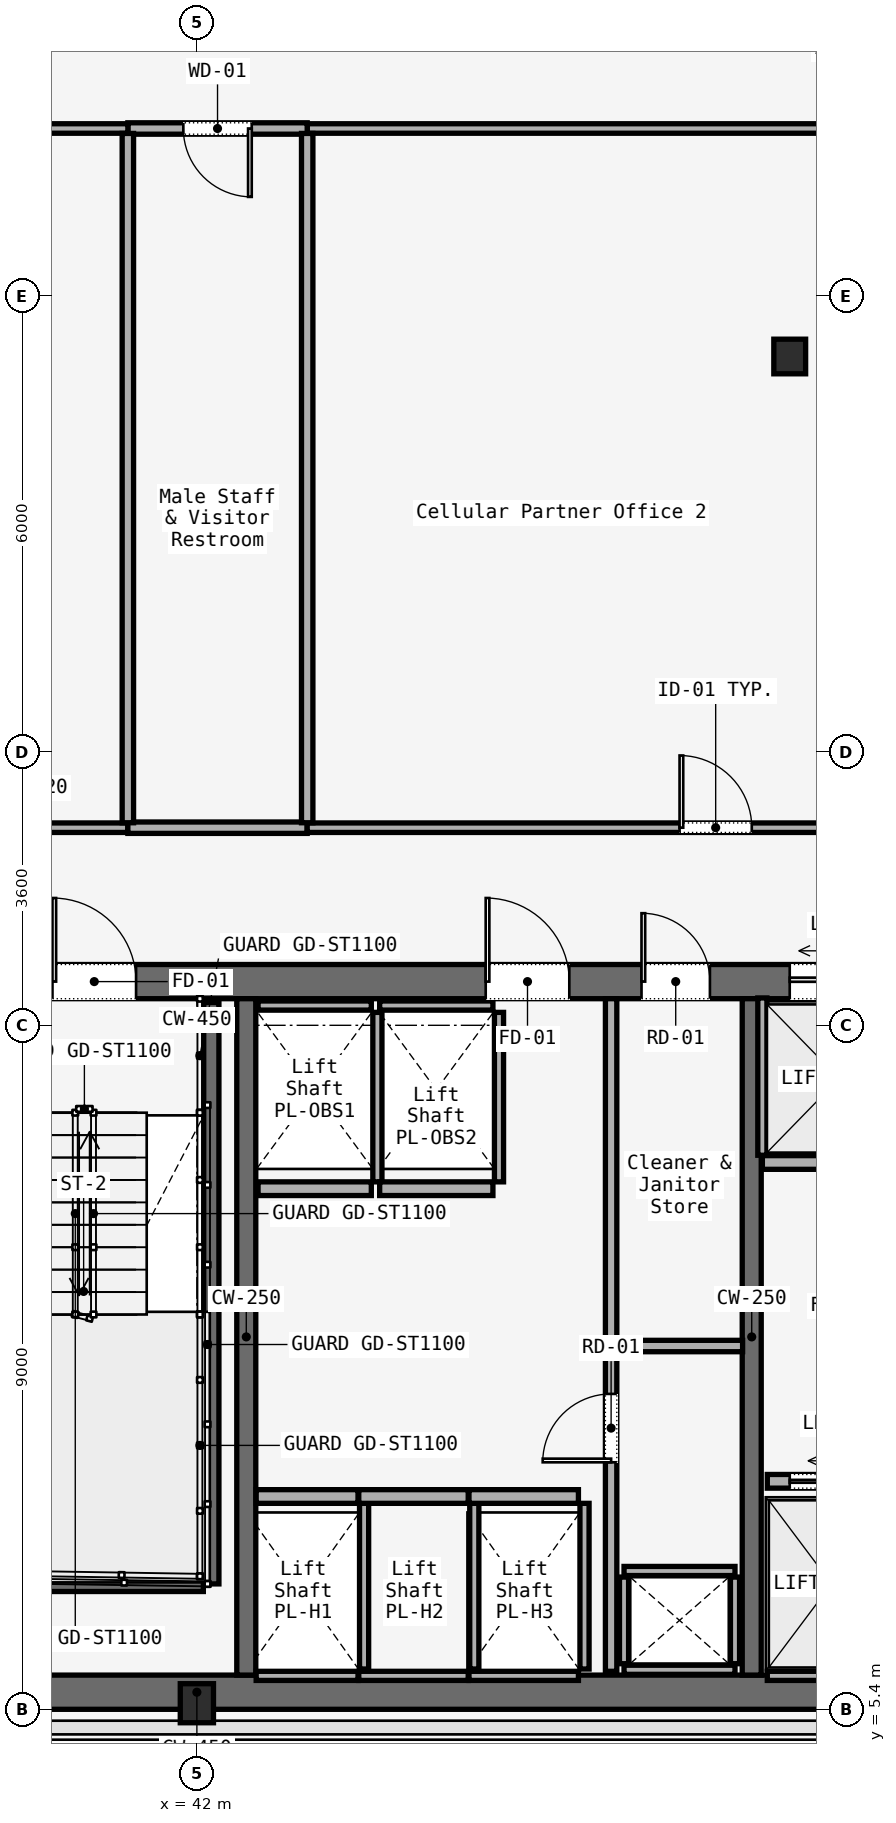
"""IFC4 building model, lengths in metres.
Left out: names, types, materials, properties, quantities, classifications, styles, units other than length and angle.
Written with IfcOpenShell. Run it as: python <this file> out.ifc"""

import sys

from ifc_helpers import new_model, si_unit, direction, frame, frame_2d, origin, origin_2d, place, context, subcontext, project, spatial, rectangle, i_section, extrude, element, fill, save


model = new_model("IFC4")
c1 = context("Model", 3, precision=1e-05, world=origin(), true_north=direction((0.0, 1.0)))
c2 = subcontext(c1, "Body", "Model", "MODEL_VIEW")
j1 = project(units=[si_unit("LENGTHUNIT", "METRE"), si_unit("PLANEANGLEUNIT", "RADIAN")], contexts=[c1])
p1 = place(None, origin())
s1 = spatial("IfcSite", under=j1, at=p1, CompositionType="ELEMENT")
p2 = place(p1, origin())
s2 = spatial("IfcBuilding", under=s1, at=p2, CompositionType="ELEMENT")
p3 = place(p2, frame((0.0, 0.0, 81.6)))
s3 = spatial("IfcBuildingStorey", under=s2, at=p3, CompositionType="ELEMENT", Elevation=81.6)
p4 = place(p3, frame((26.45, 14.975, 0.0), z_axis=(0.0, 0.0, 1.0), x_axis=(1.0, 0.0, 0.0)))
e1 = element("IfcWall", 1, at=p4, inside=s3, PredefinedType="SOLIDWALL", context=c2, shape_type="SweptSolid", body=[
    extrude(rectangle(XDim=31.1, YDim=0.45, at=frame_2d((15.55, 0.0))), origin(), (0.0, 0.0, 1.0), 3.58),
])
p5 = place(p4, frame((1.65, 0.0, 0.0)))
e2 = element("IfcOpeningElement", 2, at=p5, cuts=e1, PredefinedType="OPENING", context=c2, shape_type="SweptSolid", body=[
    extrude(rectangle(XDim=1.1, YDim=2.2, at=frame_2d((0.55, 1.1))), frame((0.0, 0.225, 0.0), z_axis=(0.0, -1.0, 0.0), x_axis=(1.0, 0.0, 0.0)), (0.0, 0.0, 1.0), 0.45),
])
p6 = place(p4, frame((13.65, 0.0, 0.0)))
e3 = element("IfcOpeningElement", 3, at=p6, cuts=e1, PredefinedType="OPENING", context=c2, shape_type="SweptSolid", body=[
    extrude(rectangle(XDim=1.1, YDim=2.2, at=frame_2d((0.55, 1.1))), frame((0.0, 0.225, 0.0), z_axis=(0.0, -1.0, 0.0), x_axis=(1.0, 0.0, 0.0)), (0.0, 0.0, 1.0), 0.45),
])
p7 = place(p4, frame((25.55, 0.0, 0.0)))
e4 = element("IfcOpeningElement", 4, at=p7, cuts=e1, PredefinedType="OPENING", context=c2, shape_type="SweptSolid", body=[
    extrude(rectangle(XDim=1.1, YDim=2.2, at=frame_2d((0.55, 1.1))), frame((0.0, 0.225, 0.0), z_axis=(0.0, -1.0, 0.0), x_axis=(1.0, 0.0, 0.0)), (0.0, 0.0, 1.0), 0.45),
])
p8 = place(p4, frame((10.7, 0.0, 0.0)))
e5 = element("IfcOpeningElement", 5, at=p8, cuts=e1, PredefinedType="OPENING", context=c2, shape_type="SweptSolid", body=[
    extrude(rectangle(XDim=1.4, YDim=2.2, at=frame_2d((0.7, 1.1))), frame((0.0, 0.225, 0.0), z_axis=(0.0, -1.0, 0.0), x_axis=(1.0, 0.0, 0.0)), (0.0, 0.0, 1.0), 0.45),
])
p9 = place(p4, frame((19.35, 0.0, 0.0)))
e6 = element("IfcOpeningElement", 6, at=p9, cuts=e1, PredefinedType="OPENING", context=c2, shape_type="SweptSolid", body=[
    extrude(rectangle(XDim=1.1, YDim=2.2, at=frame_2d((0.55, 1.1))), frame((0.0, 0.225, 0.0), z_axis=(0.0, -1.0, 0.0), x_axis=(1.0, 0.0, 0.0)), (0.0, 0.0, 1.0), 0.45),
])
p10 = place(p4, frame((21.4, 0.0, 0.0)))
e7 = element("IfcOpeningElement", 7, at=p10, cuts=e1, PredefinedType="OPENING", context=c2, shape_type="SweptSolid", body=[
    extrude(rectangle(XDim=0.9, YDim=2.1, at=frame_2d((0.45, 1.05))), frame((0.0, 0.225, 0.0), z_axis=(0.0, -1.0, 0.0), x_axis=(1.0, 0.0, 0.0)), (0.0, 0.0, 1.0), 0.45),
])
p11 = place(p4, frame((23.35, 0.0, 0.0)))
e8 = element("IfcOpeningElement", 8, at=p11, cuts=e1, PredefinedType="OPENING", context=c2, shape_type="SweptSolid", body=[
    extrude(rectangle(XDim=1.3, YDim=2.3, at=frame_2d((0.65, 1.15))), frame((0.0, 0.225, 0.0), z_axis=(0.0, -1.0, 0.0), x_axis=(1.0, 0.0, 0.0)), (0.0, 0.0, 1.0), 0.45),
])
p12 = place(p3, frame((26.45, 5.625, 0.0), z_axis=(0.0, 0.0, 1.0), x_axis=(1.0, 0.0, 0.0)))
e9 = element("IfcWall", 9, at=p12, inside=s3, PredefinedType="SOLIDWALL", context=c2, shape_type="SweptSolid", body=[
    extrude(rectangle(XDim=31.1, YDim=0.45, at=frame_2d((15.55, 0.0))), origin(), (0.0, 0.0, 1.0), 3.58),
])
for number, where, z_axis, x_axis in (
    (10, (42.65, 5.85, 0.0), (0.0, 0.0, 1.0), (0.0, 1.0, 0.0)),
    (11, (49.3, 5.85, 0.0), (0.0, 0.0, 1.0), (0.0, 1.0, 0.0)),
):
    element("IfcWall", number, at=place(p3, frame(where, z_axis=z_axis, x_axis=x_axis)), inside=s3, PredefinedType="SOLIDWALL", context=c2, shape_type="SweptSolid", body=[
        extrude(rectangle(XDim=8.9, YDim=0.25, at=frame_2d((4.45, 0.0))), origin(), (0.0, 0.0, 1.0), 3.58),
    ])
p13 = place(p3, frame((49.8, 23.2, 0.0), z_axis=(0.0, 0.0, 1.0), x_axis=(1.0, 0.0, 0.0)))
e12 = element("IfcColumn", 12, at=p13, inside=s3, PredefinedType="COLUMN", context=c2, shape_type="SweptSolid", body=[
    extrude(i_section(OverallWidth=0.418, OverallDepth=0.456, WebThickness=0.042, FlangeThickness=0.067, FilletRadius=0.015, at=origin_2d()), origin(), (0.0, 0.0, 1.0), 3.58),
])
p14 = place(p3, frame((42.0, 5.48, 0.0), z_axis=(0.0, 0.0, 1.0), x_axis=(1.0, 0.0, 0.0)))
e13 = element("IfcColumn", 13, at=p14, inside=s3, PredefinedType="COLUMN", context=c2, shape_type="SweptSolid", body=[
    extrude(i_section(OverallWidth=0.437, OverallDepth=0.514, WebThickness=0.061, FlangeThickness=0.077, FilletRadius=0.015, at=origin_2d()), origin(), (0.0, 0.0, 1.0), 3.58),
])
p15 = place(p3, frame((42.19, 14.7, 0.0), z_axis=(0.0, 0.0, 1.0), x_axis=(0.0, -1.0, 0.0)))
e14 = element("IfcWall", 14, at=p15, inside=s3, PredefinedType="SOLIDWALL", context=c2, shape_type="SweptSolid", body=[
    extrude(rectangle(XDim=7.65, YDim=0.2, at=frame_2d((3.825, 0.0))), origin(), (0.0, 0.0, 1.0), 3.8),
])
p16 = place(p3, frame((38.97, 7.05, 0.0), z_axis=(0.0, 0.0, 1.0), x_axis=(1.0, 0.0, 0.0)))
e15 = element("IfcWall", 15, at=p16, inside=s3, PredefinedType="SOLIDWALL", context=c2, shape_type="SweptSolid", body=[
    extrude(rectangle(XDim=3.115, YDim=0.2, at=frame_2d((1.558, 0.0))), origin(), (0.0, 0.0, 1.0), 3.8),
])
for number, where, z_axis, x_axis in (
    (16, (47.62, 5.92, 0.0), (0.0, 0.0, 1.0), (1.0, 0.0, 0.0)),
    (17, (47.62, 7.22, 0.0), (0.0, 0.0, 1.0), (1.0, 0.0, 0.0)),
):
    element("IfcWall", number, at=place(p3, frame(where, z_axis=z_axis, x_axis=x_axis)), inside=s3, PredefinedType="SOLIDWALL", context=c2, shape_type="SweptSolid", body=[
        extrude(rectangle(XDim=1.46, YDim=0.12, at=frame_2d((0.73, 0.0))), origin(), (0.0, 0.0, 1.0), 2.95),
    ])
for number, where, z_axis, x_axis in (
    (18, (47.62, 6.0, 0.0), (0.0, 0.0, 1.0), (0.0, 1.0, 0.0)),
    (19, (49.08, 6.0, 0.0), (0.0, 0.0, 1.0), (0.0, 1.0, 0.0)),
):
    element("IfcWall", number, at=place(p3, frame(where, z_axis=z_axis, x_axis=x_axis)), inside=s3, PredefinedType="SOLIDWALL", context=c2, shape_type="SweptSolid", body=[
        extrude(rectangle(XDim=1.14, YDim=0.12, at=frame_2d((0.57, 0.0))), origin(), (0.0, 0.0, 1.0), 2.95),
    ])
p17 = place(p3, frame((47.45, 5.9, 0.0), z_axis=(0.0, 0.0, 1.0), x_axis=(0.0, 1.0, 0.0)))
e20 = element("IfcWall", 20, at=p17, inside=s3, PredefinedType="PARTITIONING", context=c2, shape_type="SweptSolid", body=[
    extrude(rectangle(XDim=8.85, YDim=0.15, at=frame_2d((4.425, 0.0))), origin(), (0.0, 0.0, 1.0), 2.95),
])
p18 = place(p17, frame((2.75, 0.0, 0.0)))
e21 = element("IfcOpeningElement", 21, at=p18, cuts=e20, PredefinedType="OPENING", context=c2, shape_type="SweptSolid", body=[
    extrude(rectangle(XDim=0.9, YDim=2.1, at=frame_2d((0.45, 1.05))), frame((0.0, 0.075, 0.0), z_axis=(0.0, -1.0, 0.0), x_axis=(1.0, 0.0, 0.0)), (0.0, 0.0, 1.0), 0.15),
])
p19 = place(p3, frame((47.45, 10.18, 0.0), z_axis=(0.0, 0.0, 1.0), x_axis=(1.0, 0.0, 0.0)))
e22 = element("IfcWall", 22, at=p19, inside=s3, PredefinedType="PARTITIONING", context=c2, shape_type="SweptSolid", body=[
    extrude(rectangle(XDim=1.73, YDim=0.15, at=frame_2d((0.865, 0.0))), origin(), (0.0, 0.0, 1.0), 2.95),
])
p20 = place(p3, frame((42.78, 8.2, 0.0), z_axis=(0.0, 0.0, 1.0), x_axis=(1.0, 0.0, 0.0)))
e23 = element("IfcWall", 23, at=p20, inside=s3, PredefinedType="SOLIDWALL", context=c2, shape_type="SweptSolid", body=[
    extrude(rectangle(XDim=1.34, YDim=0.18, at=frame_2d((0.67, 0.0))), origin(), (0.0, 0.0, 1.0), 2.95),
])
p21 = place(p3, frame((42.78, 5.84, 0.0), z_axis=(0.0, 0.0, 1.0), x_axis=(1.0, 0.0, 0.0)))
e24 = element("IfcWall", 24, at=p21, inside=s3, PredefinedType="SOLIDWALL", context=c2, shape_type="SweptSolid", body=[
    extrude(rectangle(XDim=1.34, YDim=0.12, at=frame_2d((0.67, 0.0))), origin(), (0.0, 0.0, 1.0), 2.95),
])
p22 = place(p3, frame((44.2, 5.93, 0.0), z_axis=(0.0, 0.0, 1.0), x_axis=(0.0, 1.0, 0.0)))
e25 = element("IfcWall", 25, at=p22, inside=s3, PredefinedType="SOLIDWALL", context=c2, shape_type="SweptSolid", body=[
    extrude(rectangle(XDim=2.18, YDim=0.12, at=frame_2d((1.09, 0.0))), origin(), (0.0, 0.0, 1.0), 2.95),
])
p23 = place(p3, frame((44.13, 8.2, 0.0), z_axis=(0.0, 0.0, 1.0), x_axis=(1.0, 0.0, 0.0)))
e26 = element("IfcWall", 26, at=p23, inside=s3, PredefinedType="SOLIDWALL", context=c2, shape_type="SweptSolid", body=[
    extrude(rectangle(XDim=1.44, YDim=0.18, at=frame_2d((0.72, 0.0))), origin(), (0.0, 0.0, 1.0), 2.95),
])
p24 = place(p3, frame((44.13, 5.84, 0.0), z_axis=(0.0, 0.0, 1.0), x_axis=(1.0, 0.0, 0.0)))
e27 = element("IfcWall", 27, at=p24, inside=s3, PredefinedType="SOLIDWALL", context=c2, shape_type="SweptSolid", body=[
    extrude(rectangle(XDim=1.44, YDim=0.12, at=frame_2d((0.72, 0.0))), origin(), (0.0, 0.0, 1.0), 2.95),
])
p25 = place(p3, frame((45.65, 5.93, 0.0), z_axis=(0.0, 0.0, 1.0), x_axis=(0.0, 1.0, 0.0)))
e28 = element("IfcWall", 28, at=p25, inside=s3, PredefinedType="SOLIDWALL", context=c2, shape_type="SweptSolid", body=[
    extrude(rectangle(XDim=2.18, YDim=0.12, at=frame_2d((1.09, 0.0))), origin(), (0.0, 0.0, 1.0), 2.95),
])
p26 = place(p3, frame((45.58, 8.2, 0.0), z_axis=(0.0, 0.0, 1.0), x_axis=(1.0, 0.0, 0.0)))
e29 = element("IfcWall", 29, at=p26, inside=s3, PredefinedType="SOLIDWALL", context=c2, shape_type="SweptSolid", body=[
    extrude(rectangle(XDim=1.44, YDim=0.18, at=frame_2d((0.72, 0.0))), origin(), (0.0, 0.0, 1.0), 2.95),
])
p27 = place(p3, frame((45.58, 5.84, 0.0), z_axis=(0.0, 0.0, 1.0), x_axis=(1.0, 0.0, 0.0)))
e30 = element("IfcWall", 30, at=p27, inside=s3, PredefinedType="SOLIDWALL", context=c2, shape_type="SweptSolid", body=[
    extrude(rectangle(XDim=1.44, YDim=0.12, at=frame_2d((0.72, 0.0))), origin(), (0.0, 0.0, 1.0), 2.95),
])
p28 = place(p3, frame((47.1, 5.93, 0.0), z_axis=(0.0, 0.0, 1.0), x_axis=(0.0, 1.0, 0.0)))
e31 = element("IfcWall", 31, at=p28, inside=s3, PredefinedType="SOLIDWALL", context=c2, shape_type="SweptSolid", body=[
    extrude(rectangle(XDim=2.18, YDim=0.12, at=frame_2d((1.09, 0.0))), origin(), (0.0, 0.0, 1.0), 2.95),
])
p29 = place(p3, frame((42.805, 12.25, 0.0), z_axis=(0.0, 0.0, 1.0), x_axis=(1.0, 0.0, 0.0)))
e32 = element("IfcWall", 32, at=p29, inside=s3, PredefinedType="SOLIDWALL", context=c2, shape_type="SweptSolid", body=[
    extrude(rectangle(XDim=1.49, YDim=0.18, at=frame_2d((0.745, 0.0))), origin(), (0.0, 0.0, 1.0), 2.95),
])
p30 = place(p3, frame((42.805, 14.66, 0.0), z_axis=(0.0, 0.0, 1.0), x_axis=(1.0, 0.0, 0.0)))
e33 = element("IfcWall", 33, at=p30, inside=s3, PredefinedType="SOLIDWALL", context=c2, shape_type="SweptSolid", body=[
    extrude(rectangle(XDim=1.49, YDim=0.12, at=frame_2d((0.745, 0.0))), origin(), (0.0, 0.0, 1.0), 2.95),
])
p31 = place(p3, frame((44.375, 12.34, 0.0), z_axis=(0.0, 0.0, 1.0), x_axis=(0.0, 1.0, 0.0)))
e34 = element("IfcWall", 34, at=p31, inside=s3, PredefinedType="SOLIDWALL", context=c2, shape_type="SweptSolid", body=[
    extrude(rectangle(XDim=2.23, YDim=0.12, at=frame_2d((1.115, 0.0))), origin(), (0.0, 0.0, 1.0), 2.95),
])
p32 = place(p3, frame((44.405, 12.25, 0.0), z_axis=(0.0, 0.0, 1.0), x_axis=(1.0, 0.0, 0.0)))
e35 = element("IfcWall", 35, at=p32, inside=s3, PredefinedType="SOLIDWALL", context=c2, shape_type="SweptSolid", body=[
    extrude(rectangle(XDim=1.49, YDim=0.18, at=frame_2d((0.745, 0.0))), origin(), (0.0, 0.0, 1.0), 2.95),
])
p33 = place(p3, frame((44.405, 14.66, 0.0), z_axis=(0.0, 0.0, 1.0), x_axis=(1.0, 0.0, 0.0)))
e36 = element("IfcWall", 36, at=p33, inside=s3, PredefinedType="SOLIDWALL", context=c2, shape_type="SweptSolid", body=[
    extrude(rectangle(XDim=1.49, YDim=0.12, at=frame_2d((0.745, 0.0))), origin(), (0.0, 0.0, 1.0), 2.95),
])
p34 = place(p3, frame((45.975, 12.34, 0.0), z_axis=(0.0, 0.0, 1.0), x_axis=(0.0, 1.0, 0.0)))
e37 = element("IfcWall", 37, at=p34, inside=s3, PredefinedType="SOLIDWALL", context=c2, shape_type="SweptSolid", body=[
    extrude(rectangle(XDim=2.23, YDim=0.12, at=frame_2d((1.115, 0.0))), origin(), (0.0, 0.0, 1.0), 2.95),
])
p35 = place(p3, frame((49.505, 8.4, 0.0), z_axis=(0.0, 0.0, 1.0), x_axis=(1.0, 0.0, 0.0)))
e38 = element("IfcWall", 38, at=p35, inside=s3, PredefinedType="SOLIDWALL", context=c2, shape_type="SweptSolid", body=[
    extrude(rectangle(XDim=1.69, YDim=0.18, at=frame_2d((0.845, 0.0))), origin(), (0.0, 0.0, 1.0), 2.95),
])
p36 = place(p35, frame((0.295, 0.0, 0.0)))
e39 = element("IfcOpeningElement", 39, at=p36, cuts=e38, PredefinedType="OPENING", context=c2, shape_type="SweptSolid", body=[
    extrude(rectangle(XDim=1.1, YDim=2.2, at=frame_2d((0.55, 1.1))), frame((0.0, 0.09, 0.0), z_axis=(0.0, -1.0, 0.0), x_axis=(1.0, 0.0, 0.0)), (0.0, 0.0, 1.0), 0.18),
])
p37 = place(p3, frame((49.505, 5.84, 0.0), z_axis=(0.0, 0.0, 1.0), x_axis=(1.0, 0.0, 0.0)))
e40 = element("IfcWall", 40, at=p37, inside=s3, PredefinedType="SOLIDWALL", context=c2, shape_type="SweptSolid", body=[
    extrude(rectangle(XDim=1.69, YDim=0.12, at=frame_2d((0.845, 0.0))), origin(), (0.0, 0.0, 1.0), 2.95),
])
p38 = place(p3, frame((49.44, 12.595, 0.0), z_axis=(0.0, 0.0, 1.0), x_axis=(1.0, 0.0, 0.0)))
e41 = element("IfcWall", 41, at=p38, inside=s3, PredefinedType="SOLIDWALL", context=c2, shape_type="SweptSolid", body=[
    extrude(rectangle(XDim=2.04, YDim=0.18, at=frame_2d((1.02, 0.0))), origin(), (0.0, 0.0, 1.0), 2.95),
])
p39 = place(p3, frame((49.44, 12.69, 0.0), z_axis=(0.0, 0.0, 1.0), x_axis=(0.0, 1.0, 0.0)))
e42 = element("IfcWall", 42, at=p39, inside=s3, PredefinedType="SOLIDWALL", context=c2, shape_type="SweptSolid", body=[
    extrude(rectangle(XDim=2.07, YDim=0.12, at=frame_2d((1.035, 0.0))), origin(), (0.0, 0.0, 1.0), 2.95),
])
p40 = place(p3, frame((54.135, 26.2, 0.0), z_axis=(0.0, 0.0, 1.0), x_axis=(-1.0, 0.0, 0.0)))
e43 = element("IfcWall", 43, at=p40, inside=s3, PredefinedType="PARTITIONING", context=c2, shape_type="SweptSolid", body=[
    extrude(rectangle(XDim=10.684, YDim=0.125, at=frame_2d((5.342, 0.0))), origin(), (0.0, 0.0, 1.0), 2.95),
])
p41 = place(p3, frame((43.451, 26.2, 0.0), z_axis=(0.0, 0.0, 1.0), x_axis=(-1.0, 0.0, 0.0)))
e44 = element("IfcWall", 44, at=p41, inside=s3, PredefinedType="PARTITIONING", context=c2, shape_type="SweptSolid", body=[
    extrude(rectangle(XDim=2.359, YDim=0.15, at=frame_2d((1.18, 0.0))), origin(), (0.0, 0.0, 1.0), 2.95),
])
p42 = place(p41, frame((0.73, 0.0, 0.0)))
e45 = element("IfcOpeningElement", 45, at=p42, cuts=e44, PredefinedType="OPENING", context=c2, shape_type="SweptSolid", body=[
    extrude(rectangle(XDim=0.9, YDim=2.15, at=frame_2d((0.45, 1.075))), frame((0.0, 0.075, 0.0), z_axis=(0.0, -1.0, 0.0), x_axis=(1.0, 0.0, 0.0)), (0.0, 0.0, 1.0), 0.15),
])
p43 = place(p3, frame((41.092, 26.2, 0.0), z_axis=(0.0, 0.0, 1.0), x_axis=(-1.0, 0.0, 0.0)))
e46 = element("IfcWall", 46, at=p43, inside=s3, PredefinedType="PARTITIONING", context=c2, shape_type="SweptSolid", body=[
    extrude(rectangle(XDim=9.492, YDim=0.125, at=frame_2d((4.746, 0.0))), origin(), (0.0, 0.0, 1.0), 2.95),
])
p44 = place(p43, frame((4.046, 0.0, 0.0)))
e47 = element("IfcOpeningElement", 47, at=p44, cuts=e46, PredefinedType="OPENING", context=c2, shape_type="SweptSolid", body=[
    extrude(rectangle(XDim=1.4, YDim=2.2, at=frame_2d((0.7, 1.1))), frame((0.0, 0.062, 0.0), z_axis=(0.0, -1.0, 0.0), x_axis=(1.0, 0.0, 0.0)), (0.0, 0.0, 1.0), 0.125),
])
p45 = place(p3, frame((31.665, 17.0, 0.0), z_axis=(0.0, 0.0, 1.0), x_axis=(1.0, 0.0, 0.0)))
e48 = element("IfcWall", 48, at=p45, inside=s3, PredefinedType="PARTITIONING", context=c2, shape_type="SweptSolid", body=[
    extrude(rectangle(XDim=9.427, YDim=0.125, at=frame_2d((4.713, 0.0))), origin(), (0.0, 0.0, 1.0), 2.95),
])
p46 = place(p3, frame((41.092, 17.0, 0.0), z_axis=(0.0, 0.0, 1.0), x_axis=(1.0, 0.0, 0.0)))
e49 = element("IfcWall", 49, at=p46, inside=s3, PredefinedType="PARTITIONING", context=c2, shape_type="SweptSolid", body=[
    extrude(rectangle(XDim=2.359, YDim=0.15, at=frame_2d((1.18, 0.0))), origin(), (0.0, 0.0, 1.0), 2.95),
])
p47 = place(p3, frame((43.451, 17.0, 0.0), z_axis=(0.0, 0.0, 1.0), x_axis=(1.0, 0.0, 0.0)))
e50 = element("IfcWall", 50, at=p47, inside=s3, PredefinedType="PARTITIONING", context=c2, shape_type="SweptSolid", body=[
    extrude(rectangle(XDim=10.749, YDim=0.125, at=frame_2d((5.374, 0.0))), origin(), (0.0, 0.0, 1.0), 2.95),
])
p48 = place(p47, frame((4.899, 0.0, 0.0)))
e51 = element("IfcOpeningElement", 51, at=p48, cuts=e50, PredefinedType="OPENING", context=c2, shape_type="SweptSolid", body=[
    extrude(rectangle(XDim=0.95, YDim=2.2, at=frame_2d((0.475, 1.1))), frame((0.0, 0.062, 0.0), z_axis=(0.0, -1.0, 0.0), x_axis=(1.0, 0.0, 0.0)), (0.0, 0.0, 1.0), 0.125),
])
for number, where, z_axis, x_axis in (
    (52, (41.092, 26.135, 0.0), (0.0, 0.0, 1.0), (0.0, -1.0, 0.0)),
    (53, (43.451, 26.135, 0.0), (0.0, 0.0, 1.0), (0.0, -1.0, 0.0)),
):
    element("IfcWall", number, at=place(p3, frame(where, z_axis=z_axis, x_axis=x_axis)), inside=s3, PredefinedType="PARTITIONING", context=c2, shape_type="SweptSolid", body=[
        extrude(rectangle(XDim=9.07, YDim=0.15, at=frame_2d((4.535, 0.0))), origin(), (0.0, 0.0, 1.0), 2.95),
    ])
p49 = place(p6, origin())
e54 = element("IfcDoor", 54, at=p49, inside=s3, OperationType="SINGLE_SWING_RIGHT", PredefinedType="DOOR", context=c2, shape_type="SweptSolid", body=[
    extrude(rectangle(XDim=1.1, YDim=2.2, at=frame_2d((0.55, 1.1))), frame((0.0, 0.025, 0.0), z_axis=(0.0, -1.0, 0.0), x_axis=(1.0, 0.0, 0.0)), (0.0, 0.0, 1.0), 0.05),
])
fill(e3, e54)
p50 = place(p9, origin())
e55 = element("IfcDoor", 55, at=p50, inside=s3, OperationType="SINGLE_SWING_LEFT", PredefinedType="DOOR", context=c2, shape_type="SweptSolid", body=[
    extrude(rectangle(XDim=1.1, YDim=2.2, at=frame_2d((0.55, 1.1))), frame((0.0, 0.025, 0.0), z_axis=(0.0, -1.0, 0.0), x_axis=(1.0, 0.0, 0.0)), (0.0, 0.0, 1.0), 0.05),
])
fill(e6, e55)
p51 = place(p10, origin())
e56 = element("IfcDoor", 56, at=p51, inside=s3, OperationType="SINGLE_SWING_LEFT", PredefinedType="DOOR", context=c2, shape_type="SweptSolid", body=[
    extrude(rectangle(XDim=0.9, YDim=2.1, at=frame_2d((0.45, 1.05))), frame((0.0, 0.025, 0.0), z_axis=(0.0, -1.0, 0.0), x_axis=(1.0, 0.0, 0.0)), (0.0, 0.0, 1.0), 0.05),
])
fill(e7, e56)
p52 = place(p18, origin())
e57 = element("IfcDoor", 57, at=p52, inside=s3, OperationType="SINGLE_SWING_RIGHT", PredefinedType="DOOR", context=c2, shape_type="SweptSolid", body=[
    extrude(rectangle(XDim=0.9, YDim=2.1, at=frame_2d((0.45, 1.05))), frame((0.0, 0.025, 0.0), z_axis=(0.0, -1.0, 0.0), x_axis=(1.0, 0.0, 0.0)), (0.0, 0.0, 1.0), 0.05),
])
fill(e21, e57)
p53 = place(p36, origin())
e58 = element("IfcDoor", 58, at=p53, inside=s3, OperationType="SLIDING_TO_LEFT", PredefinedType="DOOR", context=c2, shape_type="SweptSolid", body=[
    extrude(rectangle(XDim=1.1, YDim=2.2, at=frame_2d((0.55, 1.1))), frame((0.0, 0.025, 0.0), z_axis=(0.0, -1.0, 0.0), x_axis=(1.0, 0.0, 0.0)), (0.0, 0.0, 1.0), 0.05),
])
fill(e39, e58)
p54 = place(p11, origin())
e59 = element("IfcDoor", 59, at=p54, inside=s3, OperationType="DOUBLE_DOOR_SLIDING", PredefinedType="DOOR", context=c2, shape_type="SweptSolid", body=[
    extrude(rectangle(XDim=1.3, YDim=2.3, at=frame_2d((0.65, 1.15))), frame((0.0, 0.025, 0.0), z_axis=(0.0, -1.0, 0.0), x_axis=(1.0, 0.0, 0.0)), (0.0, 0.0, 1.0), 0.05),
])
fill(e8, e59)
p55 = place(p42, origin())
e60 = element("IfcDoor", 60, at=p55, inside=s3, OperationType="SINGLE_SWING_LEFT", PredefinedType="DOOR", context=c2, shape_type="SweptSolid", body=[
    extrude(rectangle(XDim=0.9, YDim=2.15, at=frame_2d((0.45, 1.075))), frame((0.0, 0.025, 0.0), z_axis=(0.0, -1.0, 0.0), x_axis=(1.0, 0.0, 0.0)), (0.0, 0.0, 1.0), 0.05),
])
fill(e45, e60)
p56 = place(p48, origin())
e61 = element("IfcDoor", 61, at=p56, inside=s3, OperationType="SINGLE_SWING_RIGHT", PredefinedType="DOOR", context=c2, shape_type="SweptSolid", body=[
    extrude(rectangle(XDim=0.95, YDim=2.2, at=frame_2d((0.475, 1.1))), frame((0.0, 0.025, 0.0), z_axis=(0.0, -1.0, 0.0), x_axis=(1.0, 0.0, 0.0)), (0.0, 0.0, 1.0), 0.05),
])
fill(e51, e61)
save(model, sys.argv[1])
